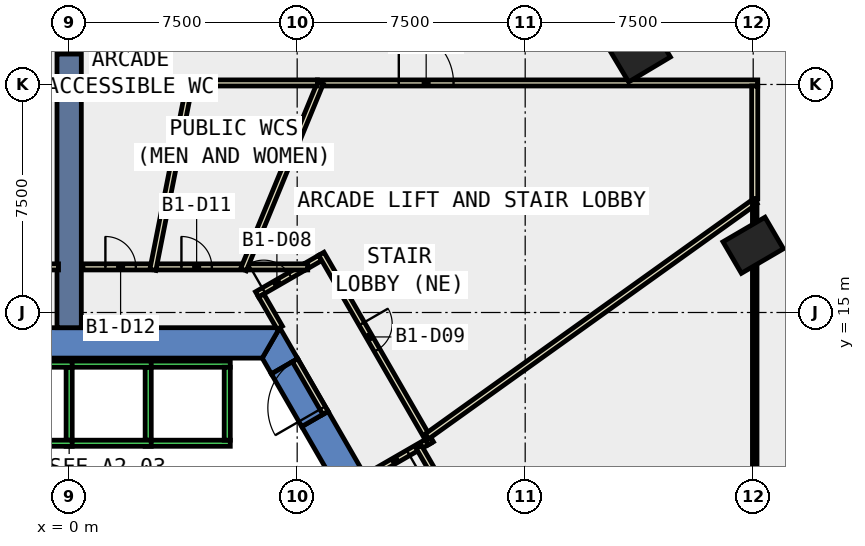
"""IFC4 building model, lengths in metres.
Left out: names, types, materials, properties, quantities, classifications, styles, units other than length and angle.
Written with IfcOpenShell. Run it as: python <this file> out.ifc"""

import sys

from ifc_helpers import new_model, si_unit, direction, frame, frame_2d, origin, origin_2d, place, context, subcontext, project, spatial, polyline, rectangle, outline, extrude, element, fill, save


model = new_model("IFC4")
c1 = context("Model", 3, precision=1e-05, world=origin(), true_north=direction((0.0, 1.0)))
c2 = subcontext(c1, "Body", "Model", "MODEL_VIEW")
j1 = project(units=[si_unit("LENGTHUNIT", "METRE"), si_unit("PLANEANGLEUNIT", "RADIAN")], contexts=[c1])
p1 = place(None, origin())
s1 = spatial("IfcSite", under=j1, at=p1, CompositionType="ELEMENT")
p2 = place(p1, origin())
s2 = spatial("IfcBuilding", under=s1, at=p2, CompositionType="ELEMENT")
p3 = place(p2, frame((0.0, 0.0, -5.5)))
s3 = spatial("IfcBuildingStorey", under=s2, at=p3, CompositionType="ELEMENT", Elevation=-5.5)
for number, where, z_axis, x_axis in (
    (1, (22.5, 17.211, -0.42), (0.0, 0.0, 1.0), (-0.504, 0.864, 0.0)),
    (2, (18.782, 23.508, -0.42), (0.0, 0.0, 1.0), (-0.513, 0.858, 0.0)),
):
    element("IfcColumn", number, at=place(p3, frame(where, z_axis=z_axis, x_axis=x_axis)), inside=s3, PredefinedType="COLUMN", context=c2, shape_type="SweptSolid", body=[
        extrude(rectangle(XDim=1.2, YDim=1.6, at=origin_2d()), origin(), (0.0, 0.0, 1.0), 5.42),
    ])
p4 = place(p3, frame((0.0, 0.0, -0.42)))
e3 = element("IfcWall", 3, at=p4, inside=s3, PredefinedType="SHEAR", context=c2, shape_type="SweptSolid", body=[
    extrude(outline(polyline([(8.517, 11.748), (7.651, 11.248), (12.702, 2.5), (13.856, 2.5), (8.517, 11.748)])), origin(), (0.0, 0.0, 1.0), 5.42),
])
p5 = place(p3, frame((0.0, 0.0, -0.42)))
e4 = element("IfcWall", 4, at=p5, inside=s3, PredefinedType="SHEAR", context=c2, shape_type="SweptSolid", body=[
    extrude(outline(polyline([(6.651, 12.98), (7.517, 13.48), (6.928, 14.5), (6.351, 13.5), (6.651, 12.98)])), origin(), (0.0, 0.0, 1.0), 5.42),
])
p6 = place(p3, frame((0.0, 0.0, 3.6)))
e5 = element("IfcWall", 5, at=p6, inside=s3, PredefinedType="SHEAR", context=c2, shape_type="SweptSolid", body=[
    extrude(outline(polyline([(7.517, 13.48), (6.651, 12.98), (7.651, 11.248), (8.517, 11.748), (7.517, 13.48)])), origin(), (0.0, 0.0, 1.0), 1.4),
])
p7 = place(p3, frame((0.0, 0.0, -0.42)))
e6 = element("IfcWall", 6, at=p7, inside=s3, PredefinedType="SHEAR", context=c2, shape_type="SweptSolid", body=[
    extrude(outline(polyline([(6.928, 14.5), (-6.928, 14.5), (-6.351, 13.5), (6.351, 13.5), (6.928, 14.5)])), origin(), (0.0, 0.0, 1.0), 5.42),
])
p8 = place(p3, frame((0.0, 14.5, -0.42), z_axis=(0.0, 0.0, 1.0), x_axis=(0.0, 1.0, 0.0)))
e7 = element("IfcWall", 7, at=p8, inside=s3, PredefinedType="SHEAR", context=c2, shape_type="SweptSolid", body=[
    extrude(rectangle(XDim=9.0, YDim=0.8, at=frame_2d((4.5, 0.0))), origin(), (0.0, 0.0, 1.0), 5.42),
])
p9 = place(p3, frame((11.845, 10.783, 0.0), z_axis=(0.0, 0.0, 1.0), x_axis=(-0.865973769406, -0.500089422704, 0.0)))
e8 = element("IfcWall", 8, at=p9, inside=s3, PredefinedType="PARTITIONING", context=c2, shape_type="SweptSolid", body=[
    extrude(rectangle(XDim=2.399, YDim=0.2, at=frame_2d((1.2, 0.0))), origin(), (0.0, 0.0, 1.0), 4.9),
])
p10 = place(p9, frame((0.8, 0.0, 0.0)))
e9 = element("IfcOpeningElement", 9, at=p10, cuts=e8, PredefinedType="OPENING", context=c2, shape_type="SweptSolid", body=[
    extrude(rectangle(XDim=1.0, YDim=2.1, at=frame_2d((0.5, 1.05))), frame((0.0, 0.11, 0.0), z_axis=(0.0, -1.0, 0.0), x_axis=(1.0, 0.0, 0.0)), (0.0, 0.0, 1.0), 0.22),
])
p11 = place(p3, frame((6.18, 15.595, 0.0), z_axis=(0.0, 0.0, 1.0), x_axis=(0.866102512622, 0.499866419787, 0.0)))
e10 = element("IfcWall", 10, at=p11, inside=s3, PredefinedType="PARTITIONING", context=c2, shape_type="SweptSolid", body=[
    extrude(rectangle(XDim=1.811, YDim=0.2, at=frame_2d((0.905, 0.0))), origin(), (0.0, 0.0, 1.0), 4.9),
])
p12 = place(p11, frame((0.254, 0.0, 0.0)))
e11 = element("IfcOpeningElement", 11, at=p12, cuts=e10, PredefinedType="OPENING", context=c2, shape_type="SweptSolid", body=[
    extrude(rectangle(XDim=1.0, YDim=2.1, at=frame_2d((0.5, 1.05))), frame((0.0, 0.11, 0.0), z_axis=(0.0, -1.0, 0.0), x_axis=(1.0, 0.0, 0.0)), (0.0, 0.0, 1.0), 0.22),
])
p13 = place(p3, frame((6.317, 15.558, 0.0), z_axis=(0.0, 0.0, 1.0), x_axis=(0.500114474492, -0.865959301817, 0.0)))
e12 = element("IfcWall", 12, at=p13, inside=s3, PredefinedType="PARTITIONING", context=c2, shape_type="SweptSolid", body=[
    extrude(rectangle(XDim=1.222, YDim=0.2, at=frame_2d((0.611, 0.0))), origin(), (0.0, 0.0, 1.0), 4.9),
])
p14 = place(p3, frame((7.748, 16.5, 0.0), z_axis=(0.0, 0.0, 1.0), x_axis=(0.865681519127, 0.500595153234, 0.0)))
e13 = element("IfcWall", 13, at=p14, inside=s3, PredefinedType="PARTITIONING", context=c2, shape_type="SweptSolid", body=[
    extrude(rectangle(XDim=0.589, YDim=0.2, at=frame_2d((0.294, 0.0))), origin(), (0.0, 0.0, 1.0), 4.9),
])
p15 = place(p3, frame((8.295, 16.932, 0.0), z_axis=(0.0, 0.0, 1.0), x_axis=(0.499982693035, -0.866035395735, 0.0)))
e14 = element("IfcWall", 14, at=p15, inside=s3, PredefinedType="PARTITIONING", context=c2, shape_type="SweptSolid", body=[
    extrude(rectangle(XDim=7.2, YDim=0.2, at=frame_2d((3.6, 0.0))), origin(), (0.0, 0.0, 1.0), 4.9),
])
p16 = place(p15, frame((2.659, 0.0, 0.0)))
e15 = element("IfcOpeningElement", 15, at=p16, cuts=e14, PredefinedType="OPENING", context=c2, shape_type="SweptSolid", body=[
    extrude(rectangle(XDim=1.0, YDim=2.1, at=frame_2d((0.5, 1.05))), frame((0.0, 0.11, 0.0), z_axis=(0.0, -1.0, 0.0), x_axis=(1.0, 0.0, 0.0)), (0.0, 0.0, 1.0), 0.22),
])
p17 = place(p3, frame((11.499, 10.583, 0.0), z_axis=(0.0, 0.0, 1.0), x_axis=(0.499933044277, -0.866064057238, 0.0)))
e16 = element("IfcWall", 16, at=p17, inside=s3, PredefinedType="PARTITIONING", context=c2, shape_type="SweptSolid", body=[
    extrude(rectangle(XDim=9.433, YDim=0.2, at=frame_2d((4.717, 0.0))), origin(), (0.0, 0.0, 1.0), 4.9),
])
p18 = place(p17, frame((8.283, 0.0, 0.0)))
e17 = element("IfcOpeningElement", 17, at=p18, cuts=e16, PredefinedType="OPENING", context=c2, shape_type="SweptSolid", body=[
    extrude(rectangle(XDim=1.0, YDim=2.1, at=frame_2d((0.5, 1.05))), frame((0.0, 0.11, 0.0), z_axis=(0.0, -1.0, 0.0), x_axis=(1.0, 0.0, 0.0)), (0.0, 0.0, 1.0), 0.22),
])
p19 = place(p3, frame((5.871, 16.5, 0.0), z_axis=(0.0, 0.0, 1.0), x_axis=(1.0, 0.0, 0.0)))
e18 = element("IfcWall", 18, at=p19, inside=s3, PredefinedType="PARTITIONING", context=c2, shape_type="SweptSolid", body=[
    extrude(rectangle(XDim=1.977, YDim=0.2, at=frame_2d((0.988, 0.0))), origin(), (0.0, 0.0, 1.0), 4.9),
])
p20 = place(p3, frame((2.872, 16.5, 0.0), z_axis=(0.0, 0.0, 1.0), x_axis=(1.0, 0.0, 0.0)))
e19 = element("IfcWall", 19, at=p20, inside=s3, PredefinedType="PARTITIONING", context=c2, shape_type="SweptSolid", body=[
    extrude(rectangle(XDim=2.799, YDim=0.2, at=frame_2d((1.399, 0.0))), origin(), (0.0, 0.0, 1.0), 4.9),
])
p21 = place(p20, frame((0.821, 0.0, 0.0)))
e20 = element("IfcOpeningElement", 20, at=p21, cuts=e19, PredefinedType="OPENING", context=c2, shape_type="SweptSolid", body=[
    extrude(rectangle(XDim=1.0, YDim=2.1, at=frame_2d((0.5, 1.05))), frame((0.0, 0.11, 0.0), z_axis=(0.0, -1.0, 0.0), x_axis=(1.0, 0.0, 0.0)), (0.0, 0.0, 1.0), 0.22),
])
p22 = place(p3, frame((0.45, 16.5, 0.0), z_axis=(0.0, 0.0, 1.0), x_axis=(1.0, 0.0, 0.0)))
e21 = element("IfcWall", 21, at=p22, inside=s3, PredefinedType="PARTITIONING", context=c2, shape_type="SweptSolid", body=[
    extrude(rectangle(XDim=2.222, YDim=0.2, at=frame_2d((1.111, 0.0))), origin(), (0.0, 0.0, 1.0), 4.9),
])
p23 = place(p22, frame((0.742, 0.0, 0.0)))
e22 = element("IfcOpeningElement", 22, at=p23, cuts=e21, PredefinedType="OPENING", context=c2, shape_type="SweptSolid", body=[
    extrude(rectangle(XDim=1.0, YDim=2.1, at=frame_2d((0.5, 1.05))), frame((0.0, 0.11, 0.0), z_axis=(0.0, -1.0, 0.0), x_axis=(1.0, 0.0, 0.0)), (0.0, 0.0, 1.0), 0.22),
])
p24 = place(p3, frame((22.57, 18.658, 0.0), z_axis=(0.0, 0.0, 1.0), x_axis=(-0.813097421088, -0.582127635334, 0.0)))
e23 = element("IfcWall", 23, at=p24, inside=s3, PredefinedType="PARTITIONING", context=c2, shape_type="SweptSolid", body=[
    extrude(rectangle(XDim=13.289, YDim=0.2, at=frame_2d((6.645, 0.0))), origin(), (0.0, 0.0, 1.0), 4.9),
])
p25 = place(p3, frame((8.165, 22.55, 0.0), z_axis=(0.0, 0.0, 1.0), x_axis=(1.0, 0.0, 0.0)))
e24 = element("IfcWall", 24, at=p25, inside=s3, PredefinedType="PARTITIONING", context=c2, shape_type="SweptSolid", body=[
    extrude(rectangle(XDim=14.485, YDim=0.2, at=frame_2d((7.242, 0.0))), origin(), (0.0, 0.0, 1.0), 4.9),
])
p26 = place(p25, frame((2.678, 0.0, 0.0)))
e25 = element("IfcOpeningElement", 25, at=p26, cuts=e24, PredefinedType="OPENING", context=c2, shape_type="SweptSolid", body=[
    extrude(rectangle(XDim=1.8, YDim=2.1, at=frame_2d((0.9, 1.05))), frame((0.0, 0.11, 0.0), z_axis=(0.0, -1.0, 0.0), x_axis=(1.0, 0.0, 0.0)), (0.0, 0.0, 1.0), 0.22),
])
p27 = place(p3, frame((22.55, 22.45, 0.0), z_axis=(0.0, 0.0, 1.0), x_axis=(0.0, -1.0, 0.0)))
e26 = element("IfcWall", 26, at=p27, inside=s3, PredefinedType="PARTITIONING", context=c2, shape_type="SweptSolid", body=[
    extrude(rectangle(XDim=3.707, YDim=0.2, at=frame_2d((1.854, 0.0))), origin(), (0.0, 0.0, 1.0), 4.9),
])
p28 = place(p3, frame((5.733, 16.408, 0.0), z_axis=(0.0, 0.0, 1.0), x_axis=(0.381121284815, 0.924525049018, 0.0)))
e27 = element("IfcWall", 27, at=p28, inside=s3, PredefinedType="PARTITIONING", context=c2, shape_type="SweptSolid", body=[
    extrude(rectangle(XDim=6.644, YDim=0.2, at=frame_2d((3.322, 0.0))), origin(), (0.0, 0.0, 1.0), 4.9),
])
p29 = place(p3, frame((22.55, 18.743, 0.0), z_axis=(0.0, 0.0, 1.0), x_axis=(0.0, -1.0, 0.0)))
e28 = element("IfcWall", 28, at=p29, inside=s3, PredefinedType="PARTITIONING", context=c2, shape_type="SweptSolid", body=[
    extrude(rectangle(XDim=29.362, YDim=0.15, at=frame_2d((14.681, 0.0))), origin(), (0.0, 0.0, 1.0), 4.9),
])
p30 = place(p3, frame((4.07, 22.55, 0.0), z_axis=(0.0, 0.0, 1.0), x_axis=(1.0, 0.0, 0.0)))
e29 = element("IfcWall", 29, at=p30, inside=s3, PredefinedType="PARTITIONING", context=c2, shape_type="SweptSolid", body=[
    extrude(rectangle(XDim=4.095, YDim=0.2, at=frame_2d((2.047, 0.0))), origin(), (0.0, 0.0, 1.0), 4.9),
])
p31 = place(p3, frame((0.55, 22.55, 0.0), z_axis=(0.0, 0.0, 1.0), x_axis=(1.0, 0.0, 0.0)))
e30 = element("IfcWall", 30, at=p31, inside=s3, PredefinedType="PARTITIONING", context=c2, shape_type="SweptSolid", body=[
    extrude(rectangle(XDim=3.32, YDim=0.2, at=frame_2d((1.66, 0.0))), origin(), (0.0, 0.0, 1.0), 4.9),
])
p32 = place(p3, frame((-22.625, 22.55, 0.0), z_axis=(0.0, 0.0, 1.0), x_axis=(1.0, 0.0, 0.0)))
e31 = element("IfcWall", 31, at=p32, inside=s3, PredefinedType="PARTITIONING", context=c2, shape_type="SweptSolid", body=[
    extrude(rectangle(XDim=22.25, YDim=0.15, at=frame_2d((11.125, 0.0))), origin(), (0.0, 0.0, 1.0), 4.9),
])
p33 = place(p3, frame((2.753, 16.402, 0.0), z_axis=(0.0, 0.0, 1.0), x_axis=(0.194139507047, 0.980973930236, 0.0)))
e32 = element("IfcWall", 32, at=p33, inside=s3, PredefinedType="PARTITIONING", context=c2, shape_type="SweptSolid", body=[
    extrude(rectangle(XDim=6.367, YDim=0.2, at=frame_2d((3.184, 0.0))), origin(), (0.0, 0.0, 1.0), 4.9),
])
p34 = place(p3, frame((-7.983, 16.5, 0.0), z_axis=(0.0, 0.0, 1.0), x_axis=(1.0, 0.0, 0.0)))
e33 = element("IfcWall", 33, at=p34, inside=s3, PredefinedType="PARTITIONING", context=c2, shape_type="SweptSolid", body=[
    extrude(rectangle(XDim=7.633, YDim=0.2, at=frame_2d((3.816, 0.0))), origin(), (0.0, 0.0, 1.0), 4.9),
])
p35 = place(p3, frame((8.43, 11.698, 0.0), z_axis=(0.0, 0.0, 1.0), x_axis=(-0.50002537861, 0.866010750942, 0.0)))
e34 = element("IfcWall", 34, at=p35, inside=s3, PredefinedType="PARTITIONING", context=c2, shape_type="SweptSolid", body=[
    extrude(rectangle(XDim=2.0, YDim=0.2, at=frame_2d((1.0, 0.0))), origin(), (0.0, 0.0, 1.0), 2.4),
])
p36 = place(p35, frame((0.19, 0.0, 0.0)))
e35 = element("IfcOpeningElement", 35, at=p36, cuts=e34, PredefinedType="OPENING", context=c2, shape_type="SweptSolid", body=[
    extrude(rectangle(XDim=1.8, YDim=2.1, at=frame_2d((0.9, 1.05))), frame((0.0, 0.11, 0.0), z_axis=(0.0, -1.0, 0.0), x_axis=(1.0, 0.0, 0.0)), (0.0, 0.0, 1.0), 0.22),
])
for number, where, z_axis, x_axis in (
    (36, (5.3, 10.7, 0.0), (0.0, 0.0, 1.0), (-1.0, 0.0, 0.0)),
    (37, (5.3, 13.3, 0.0), (0.0, 0.0, 1.0), (-1.0, 0.0, 0.0)),
):
    element("IfcWall", number, at=place(p3, frame(where, z_axis=z_axis, x_axis=x_axis)), inside=s3, PredefinedType="STANDARD", context=c2, shape_type="SweptSolid", body=[
        extrude(rectangle(XDim=2.8, YDim=0.2, at=frame_2d((1.4, 0.0))), origin(), (0.0, 0.0, 1.0), 3.6),
    ])
for number, where, z_axis, x_axis in (
    (38, (5.2, 10.8, 0.0), (0.0, 0.0, 1.0), (0.0, 1.0, 0.0)),
    (39, (2.6, 10.8, 0.0), (0.0, 0.0, 1.0), (0.0, 1.0, 0.0)),
):
    element("IfcWall", number, at=place(p3, frame(where, z_axis=z_axis, x_axis=x_axis)), inside=s3, PredefinedType="STANDARD", context=c2, shape_type="SweptSolid", body=[
        extrude(rectangle(XDim=2.4, YDim=0.2, at=frame_2d((1.2, 0.0))), origin(), (0.0, 0.0, 1.0), 3.6),
    ])
for number, where, z_axis, x_axis in (
    (40, (2.7, 10.7, 0.0), (0.0, 0.0, 1.0), (-1.0, 0.0, 0.0)),
    (41, (2.7, 13.3, 0.0), (0.0, 0.0, 1.0), (-1.0, 0.0, 0.0)),
):
    element("IfcWall", number, at=place(p3, frame(where, z_axis=z_axis, x_axis=x_axis)), inside=s3, PredefinedType="STANDARD", context=c2, shape_type="SweptSolid", body=[
        extrude(rectangle(XDim=2.8, YDim=0.2, at=frame_2d((1.4, 0.0))), origin(), (0.0, 0.0, 1.0), 3.6),
    ])
p37 = place(p3, frame((0.0, 10.8, 0.0), z_axis=(0.0, 0.0, 1.0), x_axis=(0.0, 1.0, 0.0)))
e42 = element("IfcWall", 42, at=p37, inside=s3, PredefinedType="STANDARD", context=c2, shape_type="SweptSolid", body=[
    extrude(rectangle(XDim=2.4, YDim=0.2, at=frame_2d((1.2, 0.0))), origin(), (0.0, 0.0, 1.0), 3.6),
])
for number, where, z_axis, x_axis in (
    (43, (0.1, 10.7, 0.0), (0.0, 0.0, 1.0), (-1.0, 0.0, 0.0)),
    (44, (0.1, 13.3, 0.0), (0.0, 0.0, 1.0), (-1.0, 0.0, 0.0)),
):
    element("IfcWall", number, at=place(p3, frame(where, z_axis=z_axis, x_axis=x_axis)), inside=s3, PredefinedType="STANDARD", context=c2, shape_type="SweptSolid", body=[
        extrude(rectangle(XDim=2.8, YDim=0.2, at=frame_2d((1.4, 0.0))), origin(), (0.0, 0.0, 1.0), 3.6),
    ])
p38 = place(p10, origin())
e45 = element("IfcDoor", 45, at=p38, inside=s3, OperationType="SINGLE_SWING_LEFT", PredefinedType="DOOR", context=c2, shape_type="SweptSolid", body=[
    extrude(rectangle(XDim=1.0, YDim=2.1, at=frame_2d((0.5, 1.05))), frame((0.0, 0.025, 0.0), z_axis=(0.0, -1.0, 0.0), x_axis=(1.0, 0.0, 0.0)), (0.0, 0.0, 1.0), 0.05),
])
fill(e9, e45)
p39 = place(p12, origin())
e46 = element("IfcDoor", 46, at=p39, inside=s3, OperationType="SINGLE_SWING_RIGHT", PredefinedType="DOOR", context=c2, shape_type="SweptSolid", body=[
    extrude(rectangle(XDim=1.0, YDim=2.1, at=frame_2d((0.5, 1.05))), frame((0.0, 0.025, 0.0), z_axis=(0.0, -1.0, 0.0), x_axis=(1.0, 0.0, 0.0)), (0.0, 0.0, 1.0), 0.05),
])
fill(e11, e46)
p40 = place(p16, origin())
e47 = element("IfcDoor", 47, at=p40, inside=s3, OperationType="SINGLE_SWING_LEFT", PredefinedType="DOOR", context=c2, shape_type="SweptSolid", body=[
    extrude(rectangle(XDim=1.0, YDim=2.1, at=frame_2d((0.5, 1.05))), frame((0.0, 0.025, 0.0), z_axis=(0.0, -1.0, 0.0), x_axis=(1.0, 0.0, 0.0)), (0.0, 0.0, 1.0), 0.05),
])
fill(e15, e47)
p41 = place(p21, origin())
e48 = element("IfcDoor", 48, at=p41, inside=s3, OperationType="SINGLE_SWING_LEFT", PredefinedType="DOOR", context=c2, shape_type="SweptSolid", body=[
    extrude(rectangle(XDim=1.0, YDim=2.1, at=frame_2d((0.5, 1.05))), frame((0.0, 0.025, 0.0), z_axis=(0.0, -1.0, 0.0), x_axis=(1.0, 0.0, 0.0)), (0.0, 0.0, 1.0), 0.05),
])
fill(e20, e48)
p42 = place(p23, origin())
e49 = element("IfcDoor", 49, at=p42, inside=s3, OperationType="SINGLE_SWING_RIGHT", PredefinedType="DOOR", context=c2, shape_type="SweptSolid", body=[
    extrude(rectangle(XDim=1.0, YDim=2.1, at=frame_2d((0.5, 1.05))), frame((0.0, 0.025, 0.0), z_axis=(0.0, -1.0, 0.0), x_axis=(1.0, 0.0, 0.0)), (0.0, 0.0, 1.0), 0.05),
])
fill(e22, e49)
p43 = place(p26, origin())
e50 = element("IfcDoor", 50, at=p43, inside=s3, OperationType="DOUBLE_DOOR_SINGLE_SWING", PredefinedType="DOOR", context=c2, shape_type="SweptSolid", body=[
    extrude(rectangle(XDim=1.8, YDim=2.1, at=frame_2d((0.9, 1.05))), frame((0.0, 0.025, 0.0), z_axis=(0.0, -1.0, 0.0), x_axis=(1.0, 0.0, 0.0)), (0.0, 0.0, 1.0), 0.05),
])
fill(e25, e50)
p44 = place(p36, origin())
e51 = element("IfcDoor", 51, at=p44, inside=s3, OperationType="DOUBLE_DOOR_SINGLE_SWING", PredefinedType="DOOR", context=c2, shape_type="SweptSolid", body=[
    extrude(rectangle(XDim=1.8, YDim=2.1, at=frame_2d((0.9, 1.05))), frame((0.0, 0.025, 0.0), z_axis=(0.0, -1.0, 0.0), x_axis=(1.0, 0.0, 0.0)), (0.0, 0.0, 1.0), 0.05),
])
fill(e35, e51)
save(model, sys.argv[1])
